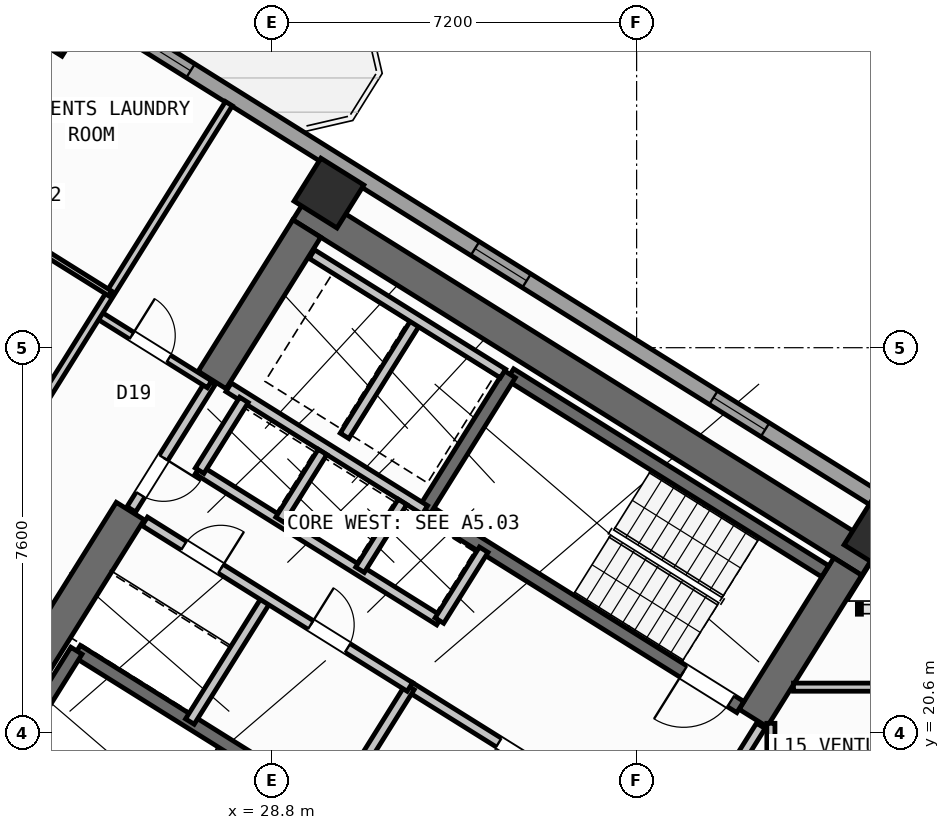
"""IFC4 building model, lengths in metres.
Left out: names, types, materials, properties, quantities, classifications, styles, units other than length and angle.
Written with IfcOpenShell. Run it as: python <this file> out.ifc"""

import sys

from ifc_helpers import new_model, si_unit, direction, frame, frame_2d, origin, origin_2d, place, context, subcontext, project, spatial, rectangle, hollow_rectangle, extrude, source, transform, mapped, element, fill, save


model = new_model("IFC4")
c1 = context("Model", 3, precision=1e-05, world=origin(), true_north=direction((0.0, 1.0)))
c2 = subcontext(c1, "Body", "Model", "MODEL_VIEW")
j1 = project(units=[si_unit("LENGTHUNIT", "METRE"), si_unit("PLANEANGLEUNIT", "RADIAN")], contexts=[c1])
p1 = place(None, origin())
s1 = spatial("IfcSite", under=j1, at=p1, CompositionType="ELEMENT")
p2 = place(p1, origin())
s2 = spatial("IfcBuilding", under=s1, at=p2, CompositionType="ELEMENT")
p3 = place(p2, frame((0.0, 0.0, 60.0)))
s3 = spatial("IfcBuildingStorey", under=s2, at=p3, CompositionType="ELEMENT", Elevation=60.0)
p4 = place(p3, frame((40.615, 23.983, 0.0), z_axis=(0.0, 0.0, 1.0), x_axis=(-0.848045953968, 0.529922692436, 0.0)))
e1 = element("IfcWall", 1, at=p4, inside=s3, PredefinedType="SHEAR", context=c2, shape_type="SweptSolid", body=[
    extrude(rectangle(XDim=13.24, YDim=0.65, at=frame_2d((6.62, 0.0))), origin(), (0.0, 0.0, 1.0), 3.35),
])
for number, where, z_axis, x_axis in (
    (2, (40.168, 23.88, 0.0), (0.0, 0.0, 1.0), (-0.53, -0.848, 0.0)),
    (3, (29.491, 30.552, 0.0), (0.0, 0.0, 1.0), (-0.53, -0.848, 0.0)),
):
    element("IfcWall", number, at=place(p3, frame(where, z_axis=z_axis, x_axis=x_axis)), inside=s3, PredefinedType="SHEAR", context=c2, shape_type="SweptSolid", body=[
        extrude(rectangle(XDim=3.525, YDim=0.65, at=frame_2d((1.763, 0.0))), origin(), (0.0, 0.0, 1.0), 3.35),
    ])
p5 = place(p3, frame((26.007, 24.976, 0.0), z_axis=(0.0, 0.0, 1.0), x_axis=(-0.529916319127, -0.848049936456, 0.0)))
e4 = element("IfcWall", 4, at=p5, inside=s3, PredefinedType="SHEAR", context=c2, shape_type="SweptSolid", body=[
    extrude(rectangle(XDim=6.375, YDim=0.65, at=frame_2d((3.188, 0.0))), origin(), (0.0, 0.0, 1.0), 3.35),
])
m1 = source(origin(), c2, "Body", "SweptSolid", [
    extrude(hollow_rectangle(XDim=1.0, YDim=1.0, WallThickness=0.04, at=origin_2d()), origin(), (0.0, 0.0, 1.0), 3.6),
])
for number, where, z_axis, x_axis in (
    (5, (40.783, 24.469, 0.0), (0.0, 0.0, 1.0), (-0.848, 0.53, 0.0)),
    (6, (29.928, 31.251, 0.0), (0.0, 0.0, 1.0), (-0.848, 0.53, 0.0)),
    (7, (24.5, 34.643, 0.0), (0.0, 0.0, 1.0), (-0.848, 0.53, 0.0)),
):
    element("IfcColumn", number, at=place(p3, frame(where, z_axis=z_axis, x_axis=x_axis)), inside=s3, PredefinedType="COLUMN", context=c2, shape_type="MappedRepresentation", body=[
        mapped(m1, transform((0.0, 0.0, 0.0), scale=1.0)),
    ])
p6 = place(p3, frame((29.268, 6.429, 0.0), z_axis=(0.0, 0.0, 1.0), x_axis=(-0.848049971435, 0.529916263149, 0.0)))
e8 = element("IfcWall", 8, at=p6, inside=s3, PredefinedType="STANDARD", context=c2, shape_type="SweptSolid", body=[
    extrude(rectangle(XDim=31.588, YDim=0.32, at=frame_2d((15.794, 0.0))), origin(), (0.0, 0.0, 1.0), 3.35),
])
p7 = place(p6, frame((16.235, 0.0, 0.0)))
e9 = element("IfcOpeningElement", 9, at=p7, cuts=e8, PredefinedType="OPENING", context=c2, shape_type="SweptSolid", body=[
    extrude(rectangle(XDim=1.2, YDim=2.15, at=frame_2d((0.6, 1.075))), frame((0.0, 0.17, 0.0), z_axis=(0.0, -1.0, 0.0), x_axis=(1.0, 0.0, 0.0)), (0.0, 0.0, 1.0), 0.34),
])
p8 = place(p6, frame((2.989, 0.0, 0.8)))
e10 = element("IfcOpeningElement", 10, at=p8, cuts=e8, PredefinedType="OPENING", context=c2, shape_type="SweptSolid", body=[
    extrude(rectangle(XDim=2.1, YDim=1.55, at=frame_2d((1.05, 0.775))), frame((0.0, 0.17, 0.0), z_axis=(0.0, -1.0, 0.0), x_axis=(1.0, 0.0, 0.0)), (0.0, 0.0, 1.0), 0.34),
])
p9 = place(p6, frame((8.359, 0.0, 0.8)))
e11 = element("IfcOpeningElement", 11, at=p9, cuts=e8, PredefinedType="OPENING", context=c2, shape_type="SweptSolid", body=[
    extrude(rectangle(XDim=2.1, YDim=1.55, at=frame_2d((1.05, 0.775))), frame((0.0, 0.17, 0.0), z_axis=(0.0, -1.0, 0.0), x_axis=(1.0, 0.0, 0.0)), (0.0, 0.0, 1.0), 0.34),
])
p10 = place(p6, frame((13.284, 0.0, 0.95)))
e12 = element("IfcOpeningElement", 12, at=p10, cuts=e8, PredefinedType="OPENING", context=c2, shape_type="SweptSolid", body=[
    extrude(rectangle(XDim=1.2, YDim=1.4, at=frame_2d((0.6, 0.7))), frame((0.0, 0.17, 0.0), z_axis=(0.0, -1.0, 0.0), x_axis=(1.0, 0.0, 0.0)), (0.0, 0.0, 1.0), 0.34),
])
p11 = place(p6, frame((22.374, 0.0, 0.95)))
e13 = element("IfcOpeningElement", 13, at=p11, cuts=e8, PredefinedType="OPENING", context=c2, shape_type="SweptSolid", body=[
    extrude(rectangle(XDim=1.2, YDim=1.4, at=frame_2d((0.6, 0.7))), frame((0.0, 0.17, 0.0), z_axis=(0.0, -1.0, 0.0), x_axis=(1.0, 0.0, 0.0)), (0.0, 0.0, 1.0), 0.34),
])
p12 = place(p6, frame((26.351, 0.0, 1.0)))
e14 = element("IfcOpeningElement", 14, at=p12, cuts=e8, PredefinedType="OPENING", context=c2, shape_type="SweptSolid", body=[
    extrude(rectangle(XDim=0.9, YDim=1.25, at=frame_2d((0.45, 0.625))), frame((0.0, 0.17, 0.0), z_axis=(0.0, -1.0, 0.0), x_axis=(1.0, 0.0, 0.0)), (0.0, 0.0, 1.0), 0.34),
])
p13 = place(p6, frame((29.052, 0.0, 0.85)))
e15 = element("IfcOpeningElement", 15, at=p13, cuts=e8, PredefinedType="OPENING", context=c2, shape_type="SweptSolid", body=[
    extrude(rectangle(XDim=1.8, YDim=1.5, at=frame_2d((0.9, 0.75))), frame((0.0, 0.17, 0.0), z_axis=(0.0, -1.0, 0.0), x_axis=(1.0, 0.0, 0.0)), (0.0, 0.0, 1.0), 0.34),
])
p14 = place(p3, frame((14.138, 41.825, 0.0), z_axis=(0.0, 0.0, 1.0), x_axis=(0.848046498049, -0.529921821731, 0.0)))
e16 = element("IfcWall", 16, at=p14, inside=s3, PredefinedType="STANDARD", context=c2, shape_type="SweptSolid", body=[
    extrude(rectangle(XDim=31.588, YDim=0.32, at=frame_2d((15.794, 0.0))), origin(), (0.0, 0.0, 1.0), 3.35),
])
p15 = place(p14, frame((9.772, 0.0, 0.0)))
e17 = element("IfcOpeningElement", 17, at=p15, cuts=e16, PredefinedType="OPENING", context=c2, shape_type="SweptSolid", body=[
    extrude(rectangle(XDim=1.05, YDim=2.15, at=frame_2d((0.525, 1.075))), frame((0.0, 0.17, 0.0), z_axis=(0.0, -1.0, 0.0), x_axis=(1.0, 0.0, 0.0)), (0.0, 0.0, 1.0), 0.34),
])
p16 = place(p14, frame((0.966, 0.0, 0.85)))
e18 = element("IfcOpeningElement", 18, at=p16, cuts=e16, PredefinedType="OPENING", context=c2, shape_type="SweptSolid", body=[
    extrude(rectangle(XDim=1.5, YDim=1.5, at=frame_2d((0.75, 0.75))), frame((0.0, 0.17, 0.0), z_axis=(0.0, -1.0, 0.0), x_axis=(1.0, 0.0, 0.0)), (0.0, 0.0, 1.0), 0.34),
])
p17 = place(p14, frame((4.121, 0.0, 1.0)))
e19 = element("IfcOpeningElement", 19, at=p17, cuts=e16, PredefinedType="OPENING", context=c2, shape_type="SweptSolid", body=[
    extrude(rectangle(XDim=0.9, YDim=1.25, at=frame_2d((0.45, 0.625))), frame((0.0, 0.17, 0.0), z_axis=(0.0, -1.0, 0.0), x_axis=(1.0, 0.0, 0.0)), (0.0, 0.0, 1.0), 0.34),
])
p18 = place(p14, frame((13.899, 0.0, 0.85)))
e20 = element("IfcOpeningElement", 20, at=p18, cuts=e16, PredefinedType="OPENING", context=c2, shape_type="SweptSolid", body=[
    extrude(rectangle(XDim=1.5, YDim=1.5, at=frame_2d((0.75, 0.75))), frame((0.0, 0.17, 0.0), z_axis=(0.0, -1.0, 0.0), x_axis=(1.0, 0.0, 0.0)), (0.0, 0.0, 1.0), 0.34),
])
p19 = place(p14, frame((22.019, 0.0, 0.95)))
e21 = element("IfcOpeningElement", 21, at=p19, cuts=e16, PredefinedType="OPENING", context=c2, shape_type="SweptSolid", body=[
    extrude(rectangle(XDim=1.2, YDim=1.4, at=frame_2d((0.6, 0.7))), frame((0.0, 0.17, 0.0), z_axis=(0.0, -1.0, 0.0), x_axis=(1.0, 0.0, 0.0)), (0.0, 0.0, 1.0), 0.34),
])
p20 = place(p14, frame((27.569, 0.0, 0.95)))
e22 = element("IfcOpeningElement", 22, at=p20, cuts=e16, PredefinedType="OPENING", context=c2, shape_type="SweptSolid", body=[
    extrude(rectangle(XDim=1.2, YDim=1.4, at=frame_2d((0.6, 0.7))), frame((0.0, 0.17, 0.0), z_axis=(0.0, -1.0, 0.0), x_axis=(1.0, 0.0, 0.0)), (0.0, 0.0, 1.0), 0.34),
])
p21 = place(p3, frame((31.28, 18.261, 0.0), z_axis=(0.0, 0.0, 1.0), x_axis=(-0.848051618787, 0.529913626805, 0.0)))
e23 = element("IfcWall", 23, at=p21, inside=s3, PredefinedType="SHEAR", context=c2, shape_type="SweptSolid", body=[
    extrude(rectangle(XDim=7.46, YDim=0.26, at=frame_2d((3.73, 0.0))), origin(), (0.0, 0.0, 1.0), 3.35),
])
p22 = place(p21, frame((0.36, 0.0, 0.0)))
e24 = element("IfcOpeningElement", 24, at=p22, cuts=e23, PredefinedType="OPENING", context=c2, shape_type="SweptSolid", body=[
    extrude(rectangle(XDim=0.86, YDim=2.05, at=frame_2d((0.43, 1.025))), frame((0.0, 0.14, 0.0), z_axis=(0.0, -1.0, 0.0), x_axis=(1.0, 0.0, 0.0)), (0.0, 0.0, 1.0), 0.28),
])
p23 = place(p3, frame((24.945, 22.22, 0.0), z_axis=(0.0, 0.0, 1.0), x_axis=(-0.529908658664, -0.84805472316, 0.0)))
e25 = element("IfcWall", 25, at=p23, inside=s3, PredefinedType="SHEAR", context=c2, shape_type="SweptSolid", body=[
    extrude(rectangle(XDim=3.16, YDim=0.26, at=frame_2d((1.58, 0.0))), origin(), (0.0, 0.0, 1.0), 3.35),
])
p24 = place(p3, frame((39.721, 23.788, 0.0), z_axis=(0.0, 0.0, 1.0), x_axis=(-0.848054434086, 0.529909121291, 0.0)))
e26 = element("IfcWall", 26, at=p24, inside=s3, PredefinedType="SHEAR", context=c2, shape_type="SweptSolid", body=[
    extrude(rectangle(XDim=7.33, YDim=0.26, at=frame_2d((3.665, 0.0))), origin(), (0.0, 0.0, 1.0), 3.35),
])
p25 = place(p3, frame((38.046, 21.108, 0.0), z_axis=(0.0, 0.0, 1.0), x_axis=(-0.848054434086, 0.529909121291, 0.0)))
e27 = element("IfcWall", 27, at=p25, inside=s3, PredefinedType="SHEAR", context=c2, shape_type="SweptSolid", body=[
    extrude(rectangle(XDim=7.33, YDim=0.26, at=frame_2d((3.665, 0.0))), origin(), (0.0, 0.0, 1.0), 3.35),
])
p26 = place(p25, frame((0.22, 0.0, 0.0)))
e28 = element("IfcOpeningElement", 28, at=p26, cuts=e27, PredefinedType="OPENING", context=c2, shape_type="SweptSolid", body=[
    extrude(rectangle(XDim=1.1, YDim=2.1, at=frame_2d((0.55, 1.05))), frame((0.0, 0.14, 0.0), z_axis=(0.0, -1.0, 0.0), x_axis=(1.0, 0.0, 0.0)), (0.0, 0.0, 1.0), 0.28),
])
p27 = place(p3, frame((33.496, 27.677, 0.0), z_axis=(0.0, 0.0, 1.0), x_axis=(-0.529908658664, -0.84805472316, 0.0)))
e29 = element("IfcWall", 29, at=p27, inside=s3, PredefinedType="SHEAR", context=c2, shape_type="SweptSolid", body=[
    extrude(rectangle(XDim=3.16, YDim=0.26, at=frame_2d((1.58, 0.0))), origin(), (0.0, 0.0, 1.0), 3.35),
])
p28 = place(p3, frame((36.374, 18.474, 0.0), z_axis=(0.0, 0.0, 1.0), x_axis=(-0.848051071577, 0.529914502535, 0.0)))
e30 = element("IfcWall", 30, at=p28, inside=s3, PredefinedType="STANDARD", context=c2, shape_type="SweptSolid", body=[
    extrude(rectangle(XDim=5.718, YDim=0.2, at=frame_2d((2.859, 0.0))), origin(), (0.0, 0.0, 1.0), 3.34),
])
p29 = place(p28, frame((2.498, 0.0, 0.0)))
e31 = element("IfcOpeningElement", 31, at=p29, cuts=e30, PredefinedType="OPENING", context=c2, shape_type="SweptSolid", body=[
    extrude(rectangle(XDim=1.15, YDim=2.1, at=frame_2d((0.575, 1.05))), frame((0.0, 0.11, 0.0), z_axis=(0.0, -1.0, 0.0), x_axis=(1.0, 0.0, 0.0)), (0.0, 0.0, 1.0), 0.22),
])
p30 = place(p3, frame((31.822, 24.998, 0.0), z_axis=(0.0, 0.0, 1.0), x_axis=(-0.848058348634, 0.529902856485, 0.0)))
e32 = element("IfcWall", 32, at=p30, inside=s3, PredefinedType="STANDARD", context=c2, shape_type="SweptSolid", body=[
    extrude(rectangle(XDim=4.568, YDim=0.2, at=frame_2d((2.284, 0.0))), origin(), (0.0, 0.0, 1.0), 3.34),
])
p31 = place(p3, frame((32.108, 22.814, 0.0), z_axis=(0.0, 0.0, 1.0), x_axis=(-0.848042229521, 0.529928652696, 0.0)))
e33 = element("IfcWall", 33, at=p31, inside=s3, PredefinedType="STANDARD", context=c2, shape_type="SweptSolid", body=[
    extrude(rectangle(XDim=5.62, YDim=0.2, at=frame_2d((2.81, 0.0))), origin(), (0.0, 0.0, 1.0), 3.34),
])
p32 = place(p3, frame((32.982, 24.213, 0.0), z_axis=(0.0, 0.0, 1.0), x_axis=(-0.529839334948, -0.84809803628, 0.0)))
e34 = element("IfcWall", 34, at=p32, inside=s3, PredefinedType="STANDARD", context=c2, shape_type="SweptSolid", body=[
    extrude(rectangle(XDim=1.65, YDim=0.2, at=frame_2d((0.825, 0.0))), origin(), (0.0, 0.0, 1.0), 3.34),
])
p33 = place(p3, frame((28.25, 27.17, 0.0), z_axis=(0.0, 0.0, 1.0), x_axis=(-0.529905827651, -0.848056492117, 0.0)))
e35 = element("IfcWall", 35, at=p33, inside=s3, PredefinedType="STANDARD", context=c2, shape_type="SweptSolid", body=[
    extrude(rectangle(XDim=1.65, YDim=0.2, at=frame_2d((0.825, 0.0))), origin(), (0.0, 0.0, 1.0), 3.34),
])
p34 = place(p3, frame((31.645, 28.716, 0.0), z_axis=(0.0, 0.0, 1.0), x_axis=(-0.52986693015, -0.848080795876, 0.0)))
e36 = element("IfcWall", 36, at=p34, inside=s3, PredefinedType="STANDARD", context=c2, shape_type="SweptSolid", body=[
    extrude(rectangle(XDim=2.66, YDim=0.2, at=frame_2d((1.33, 0.0))), origin(), (0.0, 0.0, 1.0), 3.34),
])
p35 = place(p3, frame((33.363, 27.69, 0.0), z_axis=(0.0, 0.0, 1.0), x_axis=(-0.848053806312, 0.529910125964, 0.0)))
e37 = element("IfcWall", 37, at=p35, inside=s3, PredefinedType="STANDARD", context=c2, shape_type="SweptSolid", body=[
    extrude(rectangle(XDim=4.448, YDim=0.2, at=frame_2d((2.224, 0.0))), origin(), (0.0, 0.0, 1.0), 3.34),
])
for number, where, z_axis, x_axis in (
    (38, (31.379, 25.156, 0.0), (0.0, 0.0, 1.0), (-0.53, -0.848, 0.0)),
    (39, (29.801, 26.142, 0.0), (0.0, 0.0, 1.0), (-0.53, -0.848, 0.0)),
):
    element("IfcWall", number, at=place(p3, frame(where, z_axis=z_axis, x_axis=x_axis)), inside=s3, PredefinedType="STANDARD", context=c2, shape_type="SweptSolid", body=[
        extrude(rectangle(XDim=1.58, YDim=0.2, at=frame_2d((0.79, 0.0))), origin(), (0.0, 0.0, 1.0), 3.34),
    ])
for number, where, z_axis, x_axis in (
    (40, (31.525, 21.504, 0.0), (0.0, 0.0, 1.0), (-0.53, -0.848, 0.0)),
    (41, (28.71, 23.263, 0.0), (0.0, 0.0, 1.0), (-0.53, -0.848, 0.0)),
):
    element("IfcWall", number, at=place(p3, frame(where, z_axis=z_axis, x_axis=x_axis)), inside=s3, PredefinedType="STANDARD", context=c2, shape_type="SweptSolid", body=[
        extrude(rectangle(XDim=2.88, YDim=0.2, at=frame_2d((1.44, 0.0))), origin(), (0.0, 0.0, 1.0), 3.34),
    ])
p36 = place(p3, frame((31.525, 21.504, 0.0), z_axis=(0.0, 0.0, 1.0), x_axis=(-0.848044998614, 0.529924221305, 0.0)))
e42 = element("IfcWall", 42, at=p36, inside=s3, PredefinedType="STANDARD", context=c2, shape_type="SweptSolid", body=[
    extrude(rectangle(XDim=6.168, YDim=0.2, at=frame_2d((3.084, 0.0))), origin(), (0.0, 0.0, 1.0), 3.34),
])
p37 = place(p36, frame((4.4, 0.0, 0.0)))
e43 = element("IfcOpeningElement", 43, at=p37, cuts=e42, PredefinedType="OPENING", context=c2, shape_type="SweptSolid", body=[
    extrude(rectangle(XDim=0.86, YDim=2.05, at=frame_2d((0.43, 1.025))), frame((0.0, 0.11, 0.0), z_axis=(0.0, -1.0, 0.0), x_axis=(1.0, 0.0, 0.0)), (0.0, 0.0, 1.0), 0.22),
])
p38 = place(p36, frame((1.45, 0.0, 0.0)))
e44 = element("IfcOpeningElement", 44, at=p38, cuts=e42, PredefinedType="OPENING", context=c2, shape_type="SweptSolid", body=[
    extrude(rectangle(XDim=0.86, YDim=2.05, at=frame_2d((0.43, 1.025))), frame((0.0, 0.11, 0.0), z_axis=(0.0, -1.0, 0.0), x_axis=(1.0, 0.0, 0.0)), (0.0, 0.0, 1.0), 0.22),
])
p39 = place(p3, frame((27.596, 27.52, 0.0), z_axis=(0.0, 0.0, 1.0), x_axis=(-0.529865479138, -0.848081702443, 0.0)))
e45 = element("IfcWall", 45, at=p39, inside=s3, PredefinedType="STANDARD", context=c2, shape_type="SweptSolid", body=[
    extrude(rectangle(XDim=2.96, YDim=0.2, at=frame_2d((1.48, 0.0))), origin(), (0.0, 0.0, 1.0), 3.34),
])
p40 = place(p39, frame((1.76, 0.0, 0.0)))
e46 = element("IfcOpeningElement", 46, at=p40, cuts=e45, PredefinedType="OPENING", context=c2, shape_type="SweptSolid", body=[
    extrude(rectangle(XDim=0.86, YDim=2.05, at=frame_2d((0.43, 1.025))), frame((0.0, 0.11, 0.0), z_axis=(0.0, -1.0, 0.0), x_axis=(1.0, 0.0, 0.0)), (0.0, 0.0, 1.0), 0.22),
])
p41 = place(p3, frame((27.57, 27.478, 0.0), z_axis=(0.0, 0.0, 1.0), x_axis=(-0.848050851465, 0.529914854792, 0.0)))
e47 = element("IfcWall", 47, at=p41, inside=s3, PredefinedType="PARTITIONING", context=c2, shape_type="SweptSolid", body=[
    extrude(rectangle(XDim=2.61, YDim=0.16, at=frame_2d((1.305, 0.0))), origin(), (0.0, 0.0, 1.0), 3.34),
])
p42 = place(p41, frame((0.95, 0.0, 0.0)))
e48 = element("IfcOpeningElement", 48, at=p42, cuts=e47, PredefinedType="OPENING", context=c2, shape_type="SweptSolid", body=[
    extrude(rectangle(XDim=0.86, YDim=2.05, at=frame_2d((0.43, 1.025))), frame((0.0, 0.09, 0.0), z_axis=(0.0, -1.0, 0.0), x_axis=(1.0, 0.0, 0.0)), (0.0, 0.0, 1.0), 0.18),
])
p43 = place(p3, frame((27.953, 33.016, 0.0), z_axis=(0.0, 0.0, 1.0), x_axis=(-0.529905022231, -0.848056995381, 0.0)))
e49 = element("IfcWall", 49, at=p43, inside=s3, PredefinedType="PARTITIONING", context=c2, shape_type="SweptSolid", body=[
    extrude(rectangle(XDim=11.45, YDim=0.16, at=frame_2d((5.725, 0.0))), origin(), (0.0, 0.0, 1.0), 3.34),
])
p44 = place(p3, frame((25.612, 29.269, 0.0), z_axis=(0.0, 0.0, 1.0), x_axis=(-0.84803087207, 0.529946827537, 0.0)))
e50 = element("IfcWall", 50, at=p44, inside=s3, PredefinedType="PARTITIONING", context=c2, shape_type="SweptSolid", body=[
    extrude(rectangle(XDim=3.79, YDim=0.11, at=frame_2d((1.895, 0.0))), origin(), (0.0, 0.0, 1.0), 3.34),
])
p45 = place(p44, frame((1.435, 0.0, 0.0)))
e51 = element("IfcOpeningElement", 51, at=p45, cuts=e50, PredefinedType="OPENING", context=c2, shape_type="SweptSolid", body=[
    extrude(rectangle(XDim=0.92, YDim=2.08, at=frame_2d((0.46, 1.04))), frame((0.0, 0.065, 0.0), z_axis=(0.0, -1.0, 0.0), x_axis=(1.0, 0.0, 0.0)), (0.0, 0.0, 1.0), 0.13),
])
p46 = place(p3, frame((38.451, 20.737, 0.0), z_axis=(0.0, 0.0, 1.0), x_axis=(-0.529924799939, -0.848044637038, 0.0)))
e52 = element("IfcWall", 52, at=p46, inside=s3, PredefinedType="STANDARD", context=c2, shape_type="SweptSolid", body=[
    extrude(rectangle(XDim=2.96, YDim=0.2, at=frame_2d((1.48, 0.0))), origin(), (0.0, 0.0, 1.0), 3.34),
])
p47 = place(p46, frame((1.46, 0.0, 0.0)))
e53 = element("IfcOpeningElement", 53, at=p47, cuts=e52, PredefinedType="OPENING", context=c2, shape_type="SweptSolid", body=[
    extrude(rectangle(XDim=0.86, YDim=2.05, at=frame_2d((0.43, 1.025))), frame((0.0, 0.11, 0.0), z_axis=(0.0, -1.0, 0.0), x_axis=(1.0, 0.0, 0.0)), (0.0, 0.0, 1.0), 0.22),
])
p48 = place(p3, frame((38.65, 17.93, 0.0), z_axis=(0.0, 0.0, 1.0), x_axis=(0.0, 1.0, 0.0)))
e54 = element("IfcWall", 54, at=p48, inside=s3, PredefinedType="PARTITIONING", context=c2, shape_type="SweptSolid", body=[
    extrude(rectangle(XDim=2.857, YDim=0.16, at=frame_2d((1.428, 0.0))), origin(), (0.0, 0.0, 1.0), 3.34),
])
p49 = place(p3, frame((39.095, 21.5, 0.0), z_axis=(0.0, 0.0, 1.0), x_axis=(1.0, 0.0, 0.0)))
e55 = element("IfcWall", 55, at=p49, inside=s3, PredefinedType="PARTITIONING", context=c2, shape_type="SweptSolid", body=[
    extrude(rectangle(XDim=7.094, YDim=0.16, at=frame_2d((3.547, 0.0))), origin(), (0.0, 0.0, 1.0), 3.34),
])
m2 = source(origin(), c2, "Body", "SweptSolid", [
    extrude(rectangle(XDim=1.5, YDim=1.5, at=frame_2d((0.75, 0.75))), frame((0.0, 0.03, 0.0), z_axis=(0.0, -1.0, 0.0), x_axis=(1.0, 0.0, 0.0)), (0.0, 0.0, 1.0), 0.06),
])
p50 = place(p18, origin())
e56 = element("IfcWindow", 56, at=p50, inside=s3, PartitioningType="SINGLE_PANEL", PredefinedType="WINDOW", context=c2, shape_type="MappedRepresentation", body=[
    mapped(m2, transform((0.0, 0.0, 0.0), scale=1.0)),
])
fill(e20, e56)
m3 = source(origin(), c2, "Body", "SweptSolid", [
    extrude(rectangle(XDim=1.2, YDim=1.4, at=frame_2d((0.6, 0.7))), frame((0.0, 0.03, 0.0), z_axis=(0.0, -1.0, 0.0), x_axis=(1.0, 0.0, 0.0)), (0.0, 0.0, 1.0), 0.06),
])
p51 = place(p19, origin())
e57 = element("IfcWindow", 57, at=p51, inside=s3, PartitioningType="SINGLE_PANEL", PredefinedType="WINDOW", context=c2, shape_type="MappedRepresentation", body=[
    mapped(m3, transform((0.0, 0.0, 0.0), scale=1.0)),
])
fill(e21, e57)
p52 = place(p20, origin())
e58 = element("IfcWindow", 58, at=p52, inside=s3, PartitioningType="SINGLE_PANEL", PredefinedType="WINDOW", context=c2, shape_type="MappedRepresentation", body=[
    mapped(m3, transform((0.0, 0.0, 0.0), scale=1.0)),
])
fill(e22, e58)
m4 = source(origin(), c2, "Body", "SweptSolid", [
    extrude(rectangle(XDim=1.1, YDim=2.1, at=frame_2d((0.55, 1.05))), frame((0.0, 0.025, 0.0), z_axis=(0.0, -1.0, 0.0), x_axis=(1.0, 0.0, 0.0)), (0.0, 0.0, 1.0), 0.05),
])
p53 = place(p26, origin())
e59 = element("IfcDoor", 59, at=p53, inside=s3, OperationType="SINGLE_SWING_RIGHT", PredefinedType="DOOR", context=c2, shape_type="MappedRepresentation", body=[
    mapped(m4, transform((0.0, 0.0, 0.0), scale=1.0)),
])
fill(e28, e59)
m5 = source(origin(), c2, "Body", "SweptSolid", [
    extrude(rectangle(XDim=1.15, YDim=2.1, at=frame_2d((0.575, 1.05))), frame((0.0, 0.025, 0.0), z_axis=(0.0, -1.0, 0.0), x_axis=(1.0, 0.0, 0.0)), (0.0, 0.0, 1.0), 0.05),
])
p54 = place(p29, origin())
e60 = element("IfcDoor", 60, at=p54, inside=s3, OperationType="SINGLE_SWING_LEFT", PredefinedType="DOOR", context=c2, shape_type="MappedRepresentation", body=[
    mapped(m5, transform((0.0, 0.0, 0.0), scale=1.0)),
])
fill(e31, e60)
m6 = source(origin(), c2, "Body", "SweptSolid", [
    extrude(rectangle(XDim=0.86, YDim=2.05, at=frame_2d((0.43, 1.025))), frame((0.0, 0.025, 0.0), z_axis=(0.0, -1.0, 0.0), x_axis=(1.0, 0.0, 0.0)), (0.0, 0.0, 1.0), 0.05),
])
p55 = place(p37, frame((0.86, 0.0, 0.0), z_axis=(0.0, 0.0, 1.0), x_axis=(-1.0, 0.0, 0.0)))
e61 = element("IfcDoor", 61, at=p55, inside=s3, OperationType="SINGLE_SWING_RIGHT", PredefinedType="DOOR", context=c2, shape_type="MappedRepresentation", body=[
    mapped(m6, transform((0.0, 0.0, 0.0), scale=1.0)),
])
fill(e43, e61)
p56 = place(p38, frame((0.86, 0.0, 0.0), z_axis=(0.0, 0.0, 1.0), x_axis=(-1.0, 0.0, 0.0)))
e62 = element("IfcDoor", 62, at=p56, inside=s3, OperationType="SINGLE_SWING_LEFT", PredefinedType="DOOR", context=c2, shape_type="MappedRepresentation", body=[
    mapped(m6, transform((0.0, 0.0, 0.0), scale=1.0)),
])
fill(e44, e62)
p57 = place(p42, frame((0.86, 0.0, 0.0), z_axis=(0.0, 0.0, 1.0), x_axis=(-1.0, 0.0, 0.0)))
e63 = element("IfcDoor", 63, at=p57, inside=s3, OperationType="SINGLE_SWING_LEFT", PredefinedType="DOOR", context=c2, shape_type="MappedRepresentation", body=[
    mapped(m6, transform((0.0, 0.0, 0.0), scale=1.0)),
])
fill(e48, e63)
p58 = place(p40, origin())
e64 = element("IfcDoor", 64, at=p58, inside=s3, OperationType="SINGLE_SWING_LEFT", PredefinedType="DOOR", context=c2, shape_type="MappedRepresentation", body=[
    mapped(m6, transform((0.0, 0.0, 0.0), scale=1.0)),
])
fill(e46, e64)
save(model, sys.argv[1])
